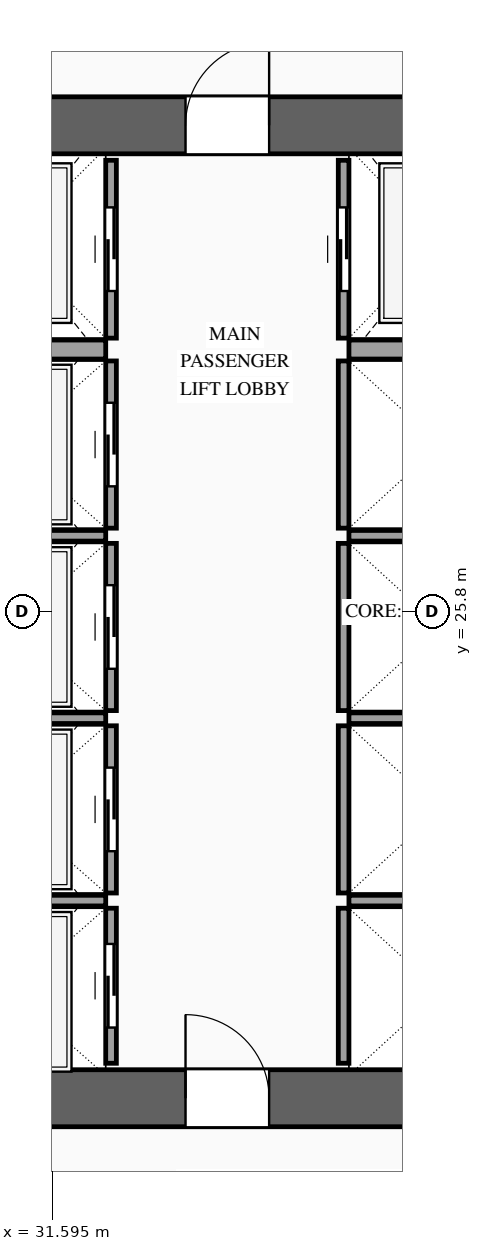
"""IFC4 building model, lengths in metres.
Left out: names, types, materials, properties, quantities, classifications, styles, units other than length and angle.
Written with IfcOpenShell. Run it as: python <this file> out.ifc"""

import sys

from ifc_helpers import new_model, si_unit, direction, frame, frame_2d, origin, place, context, subcontext, project, spatial, rectangle, extrude, source, transform, mapped, element, fill, save


model = new_model("IFC4")
c1 = context("Model", 3, precision=1e-05, world=origin(), true_north=direction((0.0, 1.0)))
c2 = subcontext(c1, "Body", "Model", "MODEL_VIEW")
j1 = project(units=[si_unit("LENGTHUNIT", "METRE"), si_unit("PLANEANGLEUNIT", "RADIAN")], contexts=[c1])
p1 = place(None, origin())
s1 = spatial("IfcSite", under=j1, at=p1, CompositionType="ELEMENT")
p2 = place(p1, origin())
s2 = spatial("IfcBuilding", under=s1, at=p2, CompositionType="ELEMENT")
p3 = place(p2, frame((0.0, 0.0, 108.2)))
s3 = spatial("IfcBuildingStorey", under=s2, at=p3, CompositionType="ELEMENT", Elevation=108.2)
p4 = place(p3, frame((23.425, 19.4, 0.0), z_axis=(0.0, 0.0, 1.0), x_axis=(1.0, 0.0, 0.0)))
e1 = element("IfcWall", 1, at=p4, inside=s3, PredefinedType="SHEAR", context=c2, shape_type="SweptSolid", body=[
    extrude(rectangle(XDim=27.15, YDim=0.75, at=frame_2d((13.575, 0.0))), origin(), (0.0, 0.0, 1.0), 3.6),
])
p5 = place(p4, frame((2.025, 0.0, 0.0)))
e2 = element("IfcOpeningElement", 2, at=p5, cuts=e1, PredefinedType="OPENING", context=c2, shape_type="SweptSolid", body=[
    extrude(rectangle(XDim=1.1, YDim=2.2, at=frame_2d((0.55, 1.1))), frame((0.0, 0.39, 0.0), z_axis=(0.0, -1.0, 0.0), x_axis=(1.0, 0.0, 0.0)), (0.0, 0.0, 1.0), 0.78),
])
p6 = place(p4, frame((9.925, 0.0, 0.0)))
e3 = element("IfcOpeningElement", 3, at=p6, cuts=e1, PredefinedType="OPENING", context=c2, shape_type="SweptSolid", body=[
    extrude(rectangle(XDim=1.1, YDim=2.2, at=frame_2d((0.55, 1.1))), frame((0.0, 0.39, 0.0), z_axis=(0.0, -1.0, 0.0), x_axis=(1.0, 0.0, 0.0)), (0.0, 0.0, 1.0), 0.78),
])
p7 = place(p4, frame((23.125, 0.0, 0.0)))
e4 = element("IfcOpeningElement", 4, at=p7, cuts=e1, PredefinedType="OPENING", context=c2, shape_type="SweptSolid", body=[
    extrude(rectangle(XDim=1.1, YDim=2.2, at=frame_2d((0.55, 1.1))), frame((0.0, 0.39, 0.0), z_axis=(0.0, -1.0, 0.0), x_axis=(1.0, 0.0, 0.0)), (0.0, 0.0, 1.0), 0.78),
])
p8 = place(p4, frame((19.745, 0.0, 0.0)))
e5 = element("IfcOpeningElement", 5, at=p8, cuts=e1, PredefinedType="OPENING", context=c2, shape_type="SweptSolid", body=[
    extrude(rectangle(XDim=0.9, YDim=2.15, at=frame_2d((0.45, 1.075))), frame((0.0, 0.39, 0.0), z_axis=(0.0, -1.0, 0.0), x_axis=(1.0, 0.0, 0.0)), (0.0, 0.0, 1.0), 0.78),
])
p9 = place(p4, frame((18.305, 0.0, 0.0)))
e6 = element("IfcOpeningElement", 6, at=p9, cuts=e1, PredefinedType="OPENING", context=c2, shape_type="SweptSolid", body=[
    extrude(rectangle(XDim=0.9, YDim=2.15, at=frame_2d((0.45, 1.075))), frame((0.0, 0.39, 0.0), z_axis=(0.0, -1.0, 0.0), x_axis=(1.0, 0.0, 0.0)), (0.0, 0.0, 1.0), 0.78),
])
p10 = place(p3, frame((23.425, 32.2, 0.0), z_axis=(0.0, 0.0, 1.0), x_axis=(1.0, 0.0, 0.0)))
e7 = element("IfcWall", 7, at=p10, inside=s3, PredefinedType="SHEAR", context=c2, shape_type="SweptSolid", body=[
    extrude(rectangle(XDim=27.15, YDim=0.75, at=frame_2d((13.575, 0.0))), origin(), (0.0, 0.0, 1.0), 3.6),
])
p11 = place(p10, frame((4.645, 0.0, 0.0)))
e8 = element("IfcOpeningElement", 8, at=p11, cuts=e7, PredefinedType="OPENING", context=c2, shape_type="SweptSolid", body=[
    extrude(rectangle(XDim=0.9, YDim=2.15, at=frame_2d((0.45, 1.075))), frame((0.0, 0.39, 0.0), z_axis=(0.0, -1.0, 0.0), x_axis=(1.0, 0.0, 0.0)), (0.0, 0.0, 1.0), 0.78),
])
p12 = place(p10, frame((9.925, 0.0, 0.0)))
e9 = element("IfcOpeningElement", 9, at=p12, cuts=e7, PredefinedType="OPENING", context=c2, shape_type="SweptSolid", body=[
    extrude(rectangle(XDim=1.1, YDim=2.2, at=frame_2d((0.55, 1.1))), frame((0.0, 0.39, 0.0), z_axis=(0.0, -1.0, 0.0), x_axis=(1.0, 0.0, 0.0)), (0.0, 0.0, 1.0), 0.78),
])
p13 = place(p10, frame((15.775, 0.0, 0.0)))
e10 = element("IfcOpeningElement", 10, at=p13, cuts=e7, PredefinedType="OPENING", context=c2, shape_type="SweptSolid", body=[
    extrude(rectangle(XDim=1.1, YDim=2.2, at=frame_2d((0.55, 1.1))), frame((0.0, 0.39, 0.0), z_axis=(0.0, -1.0, 0.0), x_axis=(1.0, 0.0, 0.0)), (0.0, 0.0, 1.0), 0.78),
])
p14 = place(p10, frame((19.745, 0.0, 0.0)))
e11 = element("IfcOpeningElement", 11, at=p14, cuts=e7, PredefinedType="OPENING", context=c2, shape_type="SweptSolid", body=[
    extrude(rectangle(XDim=0.9, YDim=2.15, at=frame_2d((0.45, 1.075))), frame((0.0, 0.39, 0.0), z_axis=(0.0, -1.0, 0.0), x_axis=(1.0, 0.0, 0.0)), (0.0, 0.0, 1.0), 0.78),
])
p15 = place(p3, frame((32.37, 19.86, 0.0), z_axis=(0.0, 0.0, 1.0), x_axis=(0.0, 1.0, 0.0)))
e12 = element("IfcWall", 12, at=p15, inside=s3, PredefinedType="SOLIDWALL", context=c2, shape_type="SweptSolid", body=[
    extrude(rectangle(XDim=2.04, YDim=0.14, at=frame_2d((1.02, 0.0))), origin(), (0.0, 0.0, 1.0), 3.38),
])
p16 = place(p15, frame((0.47, 0.0, 0.0)))
e13 = element("IfcOpeningElement", 13, at=p16, cuts=e12, PredefinedType="OPENING", context=c2, shape_type="SweptSolid", body=[
    extrude(rectangle(XDim=1.1, YDim=2.2, at=frame_2d((0.55, 1.1))), frame((0.0, 0.085, 0.0), z_axis=(0.0, -1.0, 0.0), x_axis=(1.0, 0.0, 0.0)), (0.0, 0.0, 1.0), 0.17),
])
m1 = source(origin(), c2, "Body", "SweptSolid", [
    extrude(rectangle(XDim=2.5, YDim=0.14, at=frame_2d((1.25, 0.0))), origin(), (0.0, 0.0, 1.0), 3.38),
])
p17 = place(p3, frame((29.8, 22.0, 0.0), z_axis=(0.0, 0.0, 1.0), x_axis=(1.0, 0.0, 0.0)))
e14 = element("IfcWall", 14, at=p17, inside=s3, PredefinedType="SOLIDWALL", context=c2, shape_type="MappedRepresentation", body=[
    mapped(m1, transform((0.0, 0.0, 0.0), scale=1.0)),
])
p18 = place(p3, frame((32.37, 22.1, 0.0), z_axis=(0.0, 0.0, 1.0), x_axis=(0.0, 1.0, 0.0)))
e15 = element("IfcWall", 15, at=p18, inside=s3, PredefinedType="SOLIDWALL", context=c2, shape_type="SweptSolid", body=[
    extrude(rectangle(XDim=2.2, YDim=0.14, at=frame_2d((1.1, 0.0))), origin(), (0.0, 0.0, 1.0), 3.38),
])
p19 = place(p18, frame((0.55, 0.0, 0.0)))
e16 = element("IfcOpeningElement", 16, at=p19, cuts=e15, PredefinedType="OPENING", context=c2, shape_type="SweptSolid", body=[
    extrude(rectangle(XDim=1.1, YDim=2.2, at=frame_2d((0.55, 1.1))), frame((0.0, 0.085, 0.0), z_axis=(0.0, -1.0, 0.0), x_axis=(1.0, 0.0, 0.0)), (0.0, 0.0, 1.0), 0.17),
])
p20 = place(p3, frame((29.8, 24.4, 0.0), z_axis=(0.0, 0.0, 1.0), x_axis=(1.0, 0.0, 0.0)))
e17 = element("IfcWall", 17, at=p20, inside=s3, PredefinedType="SOLIDWALL", context=c2, shape_type="MappedRepresentation", body=[
    mapped(m1, transform((0.0, 0.0, 0.0), scale=1.0)),
])
p21 = place(p3, frame((32.37, 24.5, 0.0), z_axis=(0.0, 0.0, 1.0), x_axis=(0.0, 1.0, 0.0)))
e18 = element("IfcWall", 18, at=p21, inside=s3, PredefinedType="SOLIDWALL", context=c2, shape_type="SweptSolid", body=[
    extrude(rectangle(XDim=2.2, YDim=0.14, at=frame_2d((1.1, 0.0))), origin(), (0.0, 0.0, 1.0), 3.38),
])
p22 = place(p21, frame((0.55, 0.0, 0.0)))
e19 = element("IfcOpeningElement", 19, at=p22, cuts=e18, PredefinedType="OPENING", context=c2, shape_type="SweptSolid", body=[
    extrude(rectangle(XDim=1.1, YDim=2.2, at=frame_2d((0.55, 1.1))), frame((0.0, 0.085, 0.0), z_axis=(0.0, -1.0, 0.0), x_axis=(1.0, 0.0, 0.0)), (0.0, 0.0, 1.0), 0.17),
])
p23 = place(p3, frame((29.8, 26.8, 0.0), z_axis=(0.0, 0.0, 1.0), x_axis=(1.0, 0.0, 0.0)))
e20 = element("IfcWall", 20, at=p23, inside=s3, PredefinedType="SOLIDWALL", context=c2, shape_type="MappedRepresentation", body=[
    mapped(m1, transform((0.0, 0.0, 0.0), scale=1.0)),
])
p24 = place(p3, frame((32.37, 26.9, 0.0), z_axis=(0.0, 0.0, 1.0), x_axis=(0.0, 1.0, 0.0)))
e21 = element("IfcWall", 21, at=p24, inside=s3, PredefinedType="SOLIDWALL", context=c2, shape_type="SweptSolid", body=[
    extrude(rectangle(XDim=2.2, YDim=0.14, at=frame_2d((1.1, 0.0))), origin(), (0.0, 0.0, 1.0), 3.38),
])
p25 = place(p24, frame((0.55, 0.0, 0.0)))
e22 = element("IfcOpeningElement", 22, at=p25, cuts=e21, PredefinedType="OPENING", context=c2, shape_type="SweptSolid", body=[
    extrude(rectangle(XDim=1.1, YDim=2.2, at=frame_2d((0.55, 1.1))), frame((0.0, 0.085, 0.0), z_axis=(0.0, -1.0, 0.0), x_axis=(1.0, 0.0, 0.0)), (0.0, 0.0, 1.0), 0.17),
])
p26 = place(p3, frame((32.37, 29.4, 0.0), z_axis=(0.0, 0.0, 1.0), x_axis=(0.0, 1.0, 0.0)))
e23 = element("IfcWall", 23, at=p26, inside=s3, PredefinedType="SOLIDWALL", context=c2, shape_type="SweptSolid", body=[
    extrude(rectangle(XDim=2.34, YDim=0.14, at=frame_2d((1.17, 0.0))), origin(), (0.0, 0.0, 1.0), 3.38),
])
p27 = place(p26, frame((0.62, 0.0, 0.0)))
e24 = element("IfcOpeningElement", 24, at=p27, cuts=e23, PredefinedType="OPENING", context=c2, shape_type="SweptSolid", body=[
    extrude(rectangle(XDim=1.1, YDim=2.2, at=frame_2d((0.55, 1.1))), frame((0.0, 0.085, 0.0), z_axis=(0.0, -1.0, 0.0), x_axis=(1.0, 0.0, 0.0)), (0.0, 0.0, 1.0), 0.17),
])
m2 = source(origin(), c2, "Body", "SweptSolid", [
    extrude(rectangle(XDim=2.5, YDim=0.25, at=frame_2d((1.25, 0.0))), origin(), (0.0, 0.0, 1.0), 3.38),
])
p28 = place(p3, frame((29.8, 29.25, 0.0), z_axis=(0.0, 0.0, 1.0), x_axis=(1.0, 0.0, 0.0)))
e25 = element("IfcWall", 25, at=p28, inside=s3, PredefinedType="SOLIDWALL", context=c2, shape_type="MappedRepresentation", body=[
    mapped(m2, transform((0.0, 0.0, 0.0), scale=1.0)),
])
m3 = source(origin(), c2, "Body", "SweptSolid", [
    extrude(rectangle(XDim=2.04, YDim=0.14, at=frame_2d((1.02, 0.0))), origin(), (0.0, 0.0, 1.0), 3.38),
])
p29 = place(p3, frame((35.43, 19.86, 0.0), z_axis=(0.0, 0.0, 1.0), x_axis=(0.0, 1.0, 0.0)))
e26 = element("IfcWall", 26, at=p29, inside=s3, PredefinedType="SOLIDWALL", context=c2, shape_type="MappedRepresentation", body=[
    mapped(m3, transform((0.0, 0.0, 0.0), scale=1.0)),
])
m4 = source(origin(), c2, "Body", "SweptSolid", [
    extrude(rectangle(XDim=2.4, YDim=0.14, at=frame_2d((1.2, 0.0))), origin(), (0.0, 0.0, 1.0), 3.38),
])
p30 = place(p3, frame((35.5, 22.0, 0.0), z_axis=(0.0, 0.0, 1.0), x_axis=(1.0, 0.0, 0.0)))
e27 = element("IfcWall", 27, at=p30, inside=s3, PredefinedType="SOLIDWALL", context=c2, shape_type="MappedRepresentation", body=[
    mapped(m4, transform((0.0, 0.0, 0.0), scale=1.0)),
])
m5 = source(origin(), c2, "Body", "SweptSolid", [
    extrude(rectangle(XDim=2.2, YDim=0.14, at=frame_2d((1.1, 0.0))), origin(), (0.0, 0.0, 1.0), 3.38),
])
p31 = place(p3, frame((35.43, 22.1, 0.0), z_axis=(0.0, 0.0, 1.0), x_axis=(0.0, 1.0, 0.0)))
e28 = element("IfcWall", 28, at=p31, inside=s3, PredefinedType="SOLIDWALL", context=c2, shape_type="MappedRepresentation", body=[
    mapped(m5, transform((0.0, 0.0, 0.0), scale=1.0)),
])
p32 = place(p3, frame((35.5, 24.4, 0.0), z_axis=(0.0, 0.0, 1.0), x_axis=(1.0, 0.0, 0.0)))
e29 = element("IfcWall", 29, at=p32, inside=s3, PredefinedType="SOLIDWALL", context=c2, shape_type="MappedRepresentation", body=[
    mapped(m4, transform((0.0, 0.0, 0.0), scale=1.0)),
])
p33 = place(p3, frame((35.43, 24.5, 0.0), z_axis=(0.0, 0.0, 1.0), x_axis=(0.0, 1.0, 0.0)))
e30 = element("IfcWall", 30, at=p33, inside=s3, PredefinedType="SOLIDWALL", context=c2, shape_type="MappedRepresentation", body=[
    mapped(m5, transform((0.0, 0.0, 0.0), scale=1.0)),
])
p34 = place(p3, frame((35.5, 26.8, 0.0), z_axis=(0.0, 0.0, 1.0), x_axis=(1.0, 0.0, 0.0)))
e31 = element("IfcWall", 31, at=p34, inside=s3, PredefinedType="SOLIDWALL", context=c2, shape_type="MappedRepresentation", body=[
    mapped(m4, transform((0.0, 0.0, 0.0), scale=1.0)),
])
m6 = source(origin(), c2, "Body", "SweptSolid", [
    extrude(rectangle(XDim=2.2, YDim=0.14, at=frame_2d((1.1, 0.0))), origin(), (0.0, 0.0, 1.0), 3.38),
])
p35 = place(p3, frame((35.43, 26.9, 0.0), z_axis=(0.0, 0.0, 1.0), x_axis=(0.0, 1.0, 0.0)))
e32 = element("IfcWall", 32, at=p35, inside=s3, PredefinedType="SOLIDWALL", context=c2, shape_type="MappedRepresentation", body=[
    mapped(m6, transform((0.0, 0.0, 0.0), scale=1.0)),
])
p36 = place(p3, frame((35.43, 29.4, 0.0), z_axis=(0.0, 0.0, 1.0), x_axis=(0.0, 1.0, 0.0)))
e33 = element("IfcWall", 33, at=p36, inside=s3, PredefinedType="SOLIDWALL", context=c2, shape_type="SweptSolid", body=[
    extrude(rectangle(XDim=2.34, YDim=0.14, at=frame_2d((1.17, 0.0))), origin(), (0.0, 0.0, 1.0), 3.38),
])
p37 = place(p36, frame((0.62, 0.0, 0.0)))
e34 = element("IfcOpeningElement", 34, at=p37, cuts=e33, PredefinedType="OPENING", context=c2, shape_type="SweptSolid", body=[
    extrude(rectangle(XDim=1.1, YDim=2.2, at=frame_2d((0.55, 1.1))), frame((0.0, 0.085, 0.0), z_axis=(0.0, -1.0, 0.0), x_axis=(1.0, 0.0, 0.0)), (0.0, 0.0, 1.0), 0.17),
])
m7 = source(origin(), c2, "Body", "SweptSolid", [
    extrude(rectangle(XDim=2.4, YDim=0.25, at=frame_2d((1.2, 0.0))), origin(), (0.0, 0.0, 1.0), 3.38),
])
p38 = place(p3, frame((35.5, 29.25, 0.0), z_axis=(0.0, 0.0, 1.0), x_axis=(1.0, 0.0, 0.0)))
e35 = element("IfcWall", 35, at=p38, inside=s3, PredefinedType="SOLIDWALL", context=c2, shape_type="MappedRepresentation", body=[
    mapped(m7, transform((0.0, 0.0, 0.0), scale=1.0)),
])
m8 = source(origin(), c2, "Body", "SweptSolid", [
    extrude(rectangle(XDim=1.1, YDim=2.2, at=frame_2d((0.55, 1.1))), frame((0.0, 0.025, 0.0), z_axis=(0.0, -1.0, 0.0), x_axis=(1.0, 0.0, 0.0)), (0.0, 0.0, 1.0), 0.05),
])
p39 = place(p16, origin())
e36 = element("IfcDoor", 36, at=p39, inside=s3, OperationType="SLIDING_TO_LEFT", PredefinedType="DOOR", context=c2, shape_type="MappedRepresentation", body=[
    mapped(m8, transform((0.0, 0.0, 0.0), scale=1.0)),
])
fill(e13, e36)
p40 = place(p19, origin())
e37 = element("IfcDoor", 37, at=p40, inside=s3, OperationType="SLIDING_TO_RIGHT", PredefinedType="DOOR", context=c2, shape_type="MappedRepresentation", body=[
    mapped(m8, transform((0.0, 0.0, 0.0), scale=1.0)),
])
fill(e16, e37)
p41 = place(p22, origin())
e38 = element("IfcDoor", 38, at=p41, inside=s3, OperationType="SLIDING_TO_LEFT", PredefinedType="DOOR", context=c2, shape_type="MappedRepresentation", body=[
    mapped(m8, transform((0.0, 0.0, 0.0), scale=1.0)),
])
fill(e19, e38)
p42 = place(p25, origin())
e39 = element("IfcDoor", 39, at=p42, inside=s3, OperationType="SLIDING_TO_RIGHT", PredefinedType="DOOR", context=c2, shape_type="MappedRepresentation", body=[
    mapped(m8, transform((0.0, 0.0, 0.0), scale=1.0)),
])
fill(e22, e39)
p43 = place(p27, origin())
e40 = element("IfcDoor", 40, at=p43, inside=s3, OperationType="SLIDING_TO_LEFT", PredefinedType="DOOR", context=c2, shape_type="MappedRepresentation", body=[
    mapped(m8, transform((0.0, 0.0, 0.0), scale=1.0)),
])
fill(e24, e40)
p44 = place(p37, origin())
e41 = element("IfcDoor", 41, at=p44, inside=s3, OperationType="SLIDING_TO_RIGHT", PredefinedType="DOOR", context=c2, shape_type="MappedRepresentation", body=[
    mapped(m8, transform((0.0, 0.0, 0.0), scale=1.0)),
])
fill(e34, e41)
m9 = source(origin(), c2, "Body", "SweptSolid", [
    extrude(rectangle(XDim=1.1, YDim=2.2, at=frame_2d((0.55, 1.1))), frame((0.0, 0.025, 0.0), z_axis=(0.0, -1.0, 0.0), x_axis=(1.0, 0.0, 0.0)), (0.0, 0.0, 1.0), 0.05),
])
p45 = place(p6, origin())
e42 = element("IfcDoor", 42, at=p45, inside=s3, OperationType="SINGLE_SWING_LEFT", PredefinedType="DOOR", context=c2, shape_type="MappedRepresentation", body=[
    mapped(m9, transform((0.0, 0.0, 0.0), scale=1.0)),
])
fill(e3, e42)
p46 = place(p12, origin())
e43 = element("IfcDoor", 43, at=p46, inside=s3, OperationType="SINGLE_SWING_RIGHT", PredefinedType="DOOR", context=c2, shape_type="MappedRepresentation", body=[
    mapped(m9, transform((0.0, 0.0, 0.0), scale=1.0)),
])
fill(e9, e43)
save(model, sys.argv[1])
